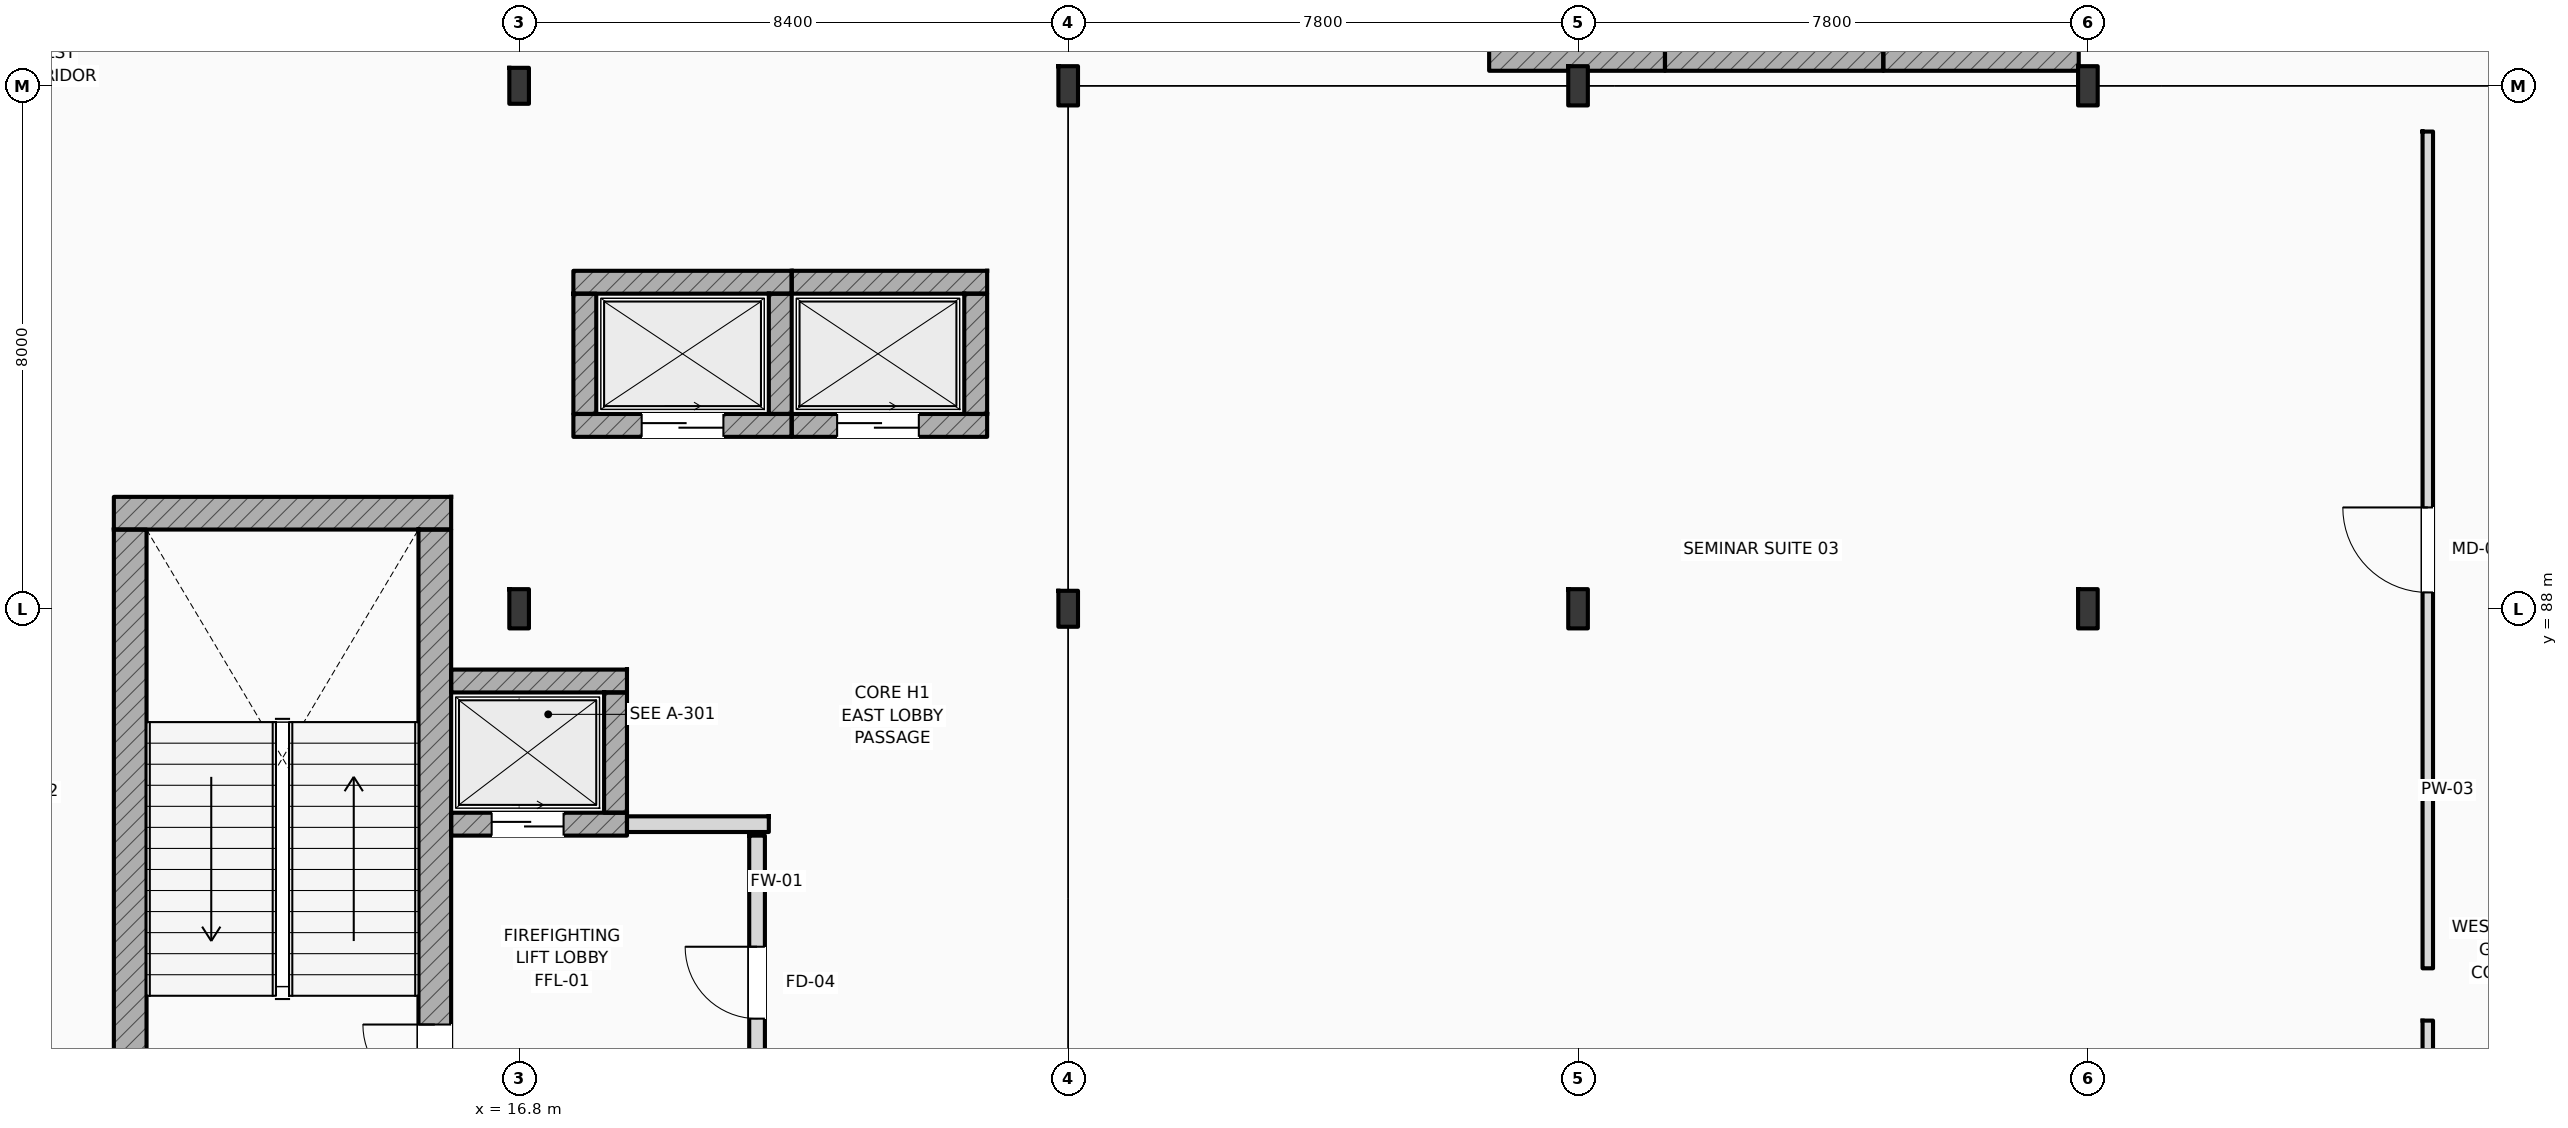
"""IFC4 building model, lengths in metres.
Left out: names, types, materials, properties, quantities, classifications, styles, units other than length and angle.
Written with IfcOpenShell. Run it as: python <this file> out.ifc"""

import sys

from ifc_helpers import new_model, si_unit, direction, frame, frame_2d, origin, origin_2d, place, context, subcontext, project, spatial, rectangle, i_section, extrude, element, fill, save


model = new_model("IFC4")
c1 = context("Model", 3, precision=1e-05, world=origin(), true_north=direction((0.0, 1.0)))
c2 = subcontext(c1, "Body", "Model", "MODEL_VIEW")
j1 = project(units=[si_unit("LENGTHUNIT", "METRE"), si_unit("PLANEANGLEUNIT", "RADIAN")], contexts=[c1])
p1 = place(None, origin())
s1 = spatial("IfcSite", under=j1, at=p1, CompositionType="ELEMENT")
p2 = place(p1, origin())
s2 = spatial("IfcBuilding", under=s1, at=p2, CompositionType="ELEMENT")
p3 = place(p2, frame((0.0, 0.0, 11.4)))
s3 = spatial("IfcBuildingStorey", under=s2, at=p3, CompositionType="ELEMENT", Elevation=11.4)
p4 = place(p3, frame((16.8, 88.0, 0.0), z_axis=(0.0, 0.0, 1.0), x_axis=(1.0, 0.0, 0.0)))
e1 = element("IfcColumn", 1, at=p4, inside=s3, PredefinedType="COLUMN", context=c2, shape_type="SweptSolid", body=[
    extrude(i_section(OverallWidth=0.3, OverallDepth=0.6, WebThickness=0.015, FlangeThickness=0.03, FilletRadius=0.027, at=origin_2d()), origin(), (0.0, 0.0, 1.0), 4.8),
])
for number, where, z_axis, x_axis in (
    (2, (16.8, 96.0, 0.0), (0.0, 0.0, 1.0), (1.0, 0.0, 0.0)),
    (3, (25.2, 88.0, 0.0), (0.0, 0.0, 1.0), (1.0, 0.0, 0.0)),
):
    element("IfcColumn", number, at=place(p3, frame(where, z_axis=z_axis, x_axis=x_axis)), inside=s3, PredefinedType="COLUMN", context=c2, shape_type="SweptSolid", body=[
        extrude(i_section(OverallWidth=0.3, OverallDepth=0.55, WebThickness=0.015, FlangeThickness=0.029, FilletRadius=0.027, at=origin_2d()), origin(), (0.0, 0.0, 1.0), 4.8),
    ])
for number, where, z_axis, x_axis in (
    (4, (25.2, 96.0, 0.0), (0.0, 0.0, 1.0), (1.0, 0.0, 0.0)),
    (5, (33.0, 96.0, 0.0), (0.0, 0.0, 1.0), (1.0, 0.0, 0.0)),
    (6, (40.8, 96.0, 0.0), (0.0, 0.0, 1.0), (1.0, 0.0, 0.0)),
    (7, (33.0, 88.0, 0.0), (0.0, 0.0, 1.0), (1.0, 0.0, 0.0)),
    (8, (40.8, 88.0, 0.0), (0.0, 0.0, 1.0), (1.0, 0.0, 0.0)),
):
    element("IfcColumn", number, at=place(p3, frame(where, z_axis=z_axis, x_axis=x_axis)), inside=s3, PredefinedType="COLUMN", context=c2, shape_type="SweptSolid", body=[
        extrude(i_section(OverallWidth=0.3, OverallDepth=0.6, WebThickness=0.015, FlangeThickness=0.03, FilletRadius=0.027, at=origin_2d()), origin(), (0.0, 0.0, 1.0), 4.8),
    ])
p5 = place(p3, frame((10.6, 89.462, 0.0), z_axis=(0.0, 0.0, 1.0), x_axis=(1.0, 0.0, 0.0)))
e9 = element("IfcWall", 9, at=p5, inside=s3, PredefinedType="SHEAR", context=c2, shape_type="SweptSolid", body=[
    extrude(rectangle(XDim=5.16, YDim=0.5, at=frame_2d((2.58, 0.0))), origin(), (0.0, 0.0, 1.0), 4.8),
])
p6 = place(p3, frame((10.85, 80.1, 0.0), z_axis=(0.0, 0.0, 1.0), x_axis=(0.0, 1.0, 0.0)))
e10 = element("IfcWall", 10, at=p6, inside=s3, PredefinedType="SHEAR", context=c2, shape_type="SweptSolid", body=[
    extrude(rectangle(XDim=9.112, YDim=0.5, at=frame_2d((4.556, 0.0))), origin(), (0.0, 0.0, 1.0), 4.8),
])
p7 = place(p3, frame((15.51, 80.1, 0.0), z_axis=(0.0, 0.0, 1.0), x_axis=(0.0, 1.0, 0.0)))
e11 = element("IfcWall", 11, at=p7, inside=s3, PredefinedType="SHEAR", context=c2, shape_type="SweptSolid", body=[
    extrude(rectangle(XDim=9.112, YDim=0.5, at=frame_2d((4.556, 0.0))), origin(), (0.0, 0.0, 1.0), 4.8),
])
p8 = place(p7, frame((0.44, 0.0, 0.0)))
e12 = element("IfcOpeningElement", 12, at=p8, cuts=e11, PredefinedType="OPENING", context=c2, shape_type="SweptSolid", body=[
    extrude(rectangle(XDim=1.1, YDim=2.2, at=frame_2d((0.55, 1.1))), frame((0.0, 0.26, 0.0), z_axis=(0.0, -1.0, 0.0), x_axis=(1.0, 0.0, 0.0)), (0.0, 0.0, 1.0), 0.52),
])
p9 = place(p3, frame((15.76, 86.895, 0.0), z_axis=(0.0, 0.0, 1.0), x_axis=(1.0, 0.0, 0.0)))
e13 = element("IfcWall", 13, at=p9, inside=s3, PredefinedType="SHEAR", context=c2, shape_type="SweptSolid", body=[
    extrude(rectangle(XDim=2.69, YDim=0.35, at=frame_2d((1.345, 0.0))), origin(), (0.0, 0.0, 1.0), 4.52),
])
p10 = place(p3, frame((15.76, 84.705, 0.0), z_axis=(0.0, 0.0, 1.0), x_axis=(1.0, 0.0, 0.0)))
e14 = element("IfcWall", 14, at=p10, inside=s3, PredefinedType="SHEAR", context=c2, shape_type="SweptSolid", body=[
    extrude(rectangle(XDim=2.69, YDim=0.35, at=frame_2d((1.345, 0.0))), origin(), (0.0, 0.0, 1.0), 4.52),
])
p11 = place(p10, frame((0.62, 0.0, 0.0)))
e15 = element("IfcOpeningElement", 15, at=p11, cuts=e14, PredefinedType="OPENING", context=c2, shape_type="SweptSolid", body=[
    extrude(rectangle(XDim=1.1, YDim=2.2, at=frame_2d((0.55, 1.1))), frame((0.0, 0.185, 0.0), z_axis=(0.0, -1.0, 0.0), x_axis=(1.0, 0.0, 0.0)), (0.0, 0.0, 1.0), 0.37),
])
p12 = place(p3, frame((18.275, 84.88, 0.0), z_axis=(0.0, 0.0, 1.0), x_axis=(0.0, 1.0, 0.0)))
e16 = element("IfcWall", 16, at=p12, inside=s3, PredefinedType="SHEAR", context=c2, shape_type="SweptSolid", body=[
    extrude(rectangle(XDim=1.84, YDim=0.35, at=frame_2d((0.92, 0.0))), origin(), (0.0, 0.0, 1.0), 4.52),
])
p13 = place(p3, frame((31.64, 96.405, 0.0), z_axis=(0.0, 0.0, 1.0), x_axis=(1.0, 0.0, 0.0)))
e17 = element("IfcWall", 17, at=p13, inside=s3, PredefinedType="SHEAR", context=c2, shape_type="SweptSolid", body=[
    extrude(rectangle(XDim=2.69, YDim=0.35, at=frame_2d((1.345, 0.0))), origin(), (0.0, 0.0, 1.0), 4.52),
])
p14 = place(p3, frame((17.63, 92.995, 0.0), z_axis=(0.0, 0.0, 1.0), x_axis=(1.0, 0.0, 0.0)))
e18 = element("IfcWall", 18, at=p14, inside=s3, PredefinedType="SHEAR", context=c2, shape_type="SweptSolid", body=[
    extrude(rectangle(XDim=3.34, YDim=0.35, at=frame_2d((1.67, 0.0))), origin(), (0.0, 0.0, 1.0), 4.52),
])
p15 = place(p3, frame((17.63, 90.805, 0.0), z_axis=(0.0, 0.0, 1.0), x_axis=(1.0, 0.0, 0.0)))
e19 = element("IfcWall", 19, at=p15, inside=s3, PredefinedType="SHEAR", context=c2, shape_type="SweptSolid", body=[
    extrude(rectangle(XDim=3.34, YDim=0.35, at=frame_2d((1.67, 0.0))), origin(), (0.0, 0.0, 1.0), 4.52),
])
p16 = place(p15, frame((1.045, 0.0, 0.0)))
e20 = element("IfcOpeningElement", 20, at=p16, cuts=e19, PredefinedType="OPENING", context=c2, shape_type="SweptSolid", body=[
    extrude(rectangle(XDim=1.25, YDim=2.25, at=frame_2d((0.625, 1.125))), frame((0.0, 0.185, 0.0), z_axis=(0.0, -1.0, 0.0), x_axis=(1.0, 0.0, 0.0)), (0.0, 0.0, 1.0), 0.37),
])
for number, where, z_axis, x_axis in (
    (21, (17.805, 90.98, 0.0), (0.0, 0.0, 1.0), (0.0, 1.0, 0.0)),
    (22, (20.795, 90.98, 0.0), (0.0, 0.0, 1.0), (0.0, 1.0, 0.0)),
):
    element("IfcWall", number, at=place(p3, frame(where, z_axis=z_axis, x_axis=x_axis)), inside=s3, PredefinedType="SHEAR", context=c2, shape_type="SweptSolid", body=[
        extrude(rectangle(XDim=1.84, YDim=0.35, at=frame_2d((0.92, 0.0))), origin(), (0.0, 0.0, 1.0), 4.52),
    ])
p17 = place(p3, frame((20.97, 92.995, 0.0), z_axis=(0.0, 0.0, 1.0), x_axis=(1.0, 0.0, 0.0)))
e23 = element("IfcWall", 23, at=p17, inside=s3, PredefinedType="SHEAR", context=c2, shape_type="SweptSolid", body=[
    extrude(rectangle(XDim=2.99, YDim=0.35, at=frame_2d((1.495, 0.0))), origin(), (0.0, 0.0, 1.0), 4.52),
])
p18 = place(p3, frame((20.97, 90.805, 0.0), z_axis=(0.0, 0.0, 1.0), x_axis=(1.0, 0.0, 0.0)))
e24 = element("IfcWall", 24, at=p18, inside=s3, PredefinedType="SHEAR", context=c2, shape_type="SweptSolid", body=[
    extrude(rectangle(XDim=2.99, YDim=0.35, at=frame_2d((1.495, 0.0))), origin(), (0.0, 0.0, 1.0), 4.52),
])
p19 = place(p18, frame((0.695, 0.0, 0.0)))
e25 = element("IfcOpeningElement", 25, at=p19, cuts=e24, PredefinedType="OPENING", context=c2, shape_type="SweptSolid", body=[
    extrude(rectangle(XDim=1.25, YDim=2.25, at=frame_2d((0.625, 1.125))), frame((0.0, 0.185, 0.0), z_axis=(0.0, -1.0, 0.0), x_axis=(1.0, 0.0, 0.0)), (0.0, 0.0, 1.0), 0.37),
])
p20 = place(p3, frame((23.785, 90.98, 0.0), z_axis=(0.0, 0.0, 1.0), x_axis=(0.0, 1.0, 0.0)))
e26 = element("IfcWall", 26, at=p20, inside=s3, PredefinedType="SHEAR", context=c2, shape_type="SweptSolid", body=[
    extrude(rectangle(XDim=1.84, YDim=0.35, at=frame_2d((0.92, 0.0))), origin(), (0.0, 0.0, 1.0), 4.52),
])
p21 = place(p3, frame((34.33, 96.405, 0.0), z_axis=(0.0, 0.0, 1.0), x_axis=(1.0, 0.0, 0.0)))
e27 = element("IfcWall", 27, at=p21, inside=s3, PredefinedType="SHEAR", context=c2, shape_type="SweptSolid", body=[
    extrude(rectangle(XDim=3.34, YDim=0.35, at=frame_2d((1.67, 0.0))), origin(), (0.0, 0.0, 1.0), 4.52),
])
p22 = place(p3, frame((37.67, 96.405, 0.0), z_axis=(0.0, 0.0, 1.0), x_axis=(1.0, 0.0, 0.0)))
e28 = element("IfcWall", 28, at=p22, inside=s3, PredefinedType="SHEAR", context=c2, shape_type="SweptSolid", body=[
    extrude(rectangle(XDim=2.99, YDim=0.35, at=frame_2d((1.495, 0.0))), origin(), (0.0, 0.0, 1.0), 4.52),
])
p23 = place(p3, frame((18.45, 84.705, 0.0), z_axis=(0.0, 0.0, 1.0), x_axis=(1.0, 0.0, 0.0)))
e29 = element("IfcWall", 29, at=p23, inside=s3, PredefinedType="STANDARD", context=c2, shape_type="SweptSolid", body=[
    extrude(rectangle(XDim=2.17, YDim=0.24, at=frame_2d((1.085, 0.0))), origin(), (0.0, 0.0, 1.0), 4.52),
])
p24 = place(p3, frame((20.44, 80.08, 0.0), z_axis=(0.0, 0.0, 1.0), x_axis=(0.0, 1.0, 0.0)))
e30 = element("IfcWall", 30, at=p24, inside=s3, PredefinedType="STANDARD", context=c2, shape_type="SweptSolid", body=[
    extrude(rectangle(XDim=4.45, YDim=0.24, at=frame_2d((2.225, 0.0))), origin(), (0.0, 0.0, 1.0), 4.52),
])
p25 = place(p24, frame((1.65, 0.0, 0.0)))
e31 = element("IfcOpeningElement", 31, at=p25, cuts=e30, PredefinedType="OPENING", context=c2, shape_type="SweptSolid", body=[
    extrude(rectangle(XDim=1.1, YDim=2.2, at=frame_2d((0.55, 1.1))), frame((0.0, 0.13, 0.0), z_axis=(0.0, -1.0, 0.0), x_axis=(1.0, 0.0, 0.0)), (0.0, 0.0, 1.0), 0.26),
])
p26 = place(p3, frame((46.0, 68.5, 0.0), z_axis=(0.0, 0.0, 1.0), x_axis=(0.0, 1.0, 0.0)))
e32 = element("IfcWall", 32, at=p26, inside=s3, PredefinedType="PARTITIONING", context=c2, shape_type="SweptSolid", body=[
    extrude(rectangle(XDim=13.2, YDim=0.16, at=frame_2d((6.6, 0.0))), origin(), (0.0, 0.0, 1.0), 4.18),
])
p27 = place(p26, frame((5.95, 0.0, 0.0)))
e33 = element("IfcOpeningElement", 33, at=p27, cuts=e32, PredefinedType="OPENING", context=c2, shape_type="SweptSolid", body=[
    extrude(rectangle(XDim=1.3, YDim=2.2, at=frame_2d((0.65, 1.1))), frame((0.0, 0.09, 0.0), z_axis=(0.0, -1.0, 0.0), x_axis=(1.0, 0.0, 0.0)), (0.0, 0.0, 1.0), 0.18),
])
p28 = place(p3, frame((46.0, 82.5, 0.0), z_axis=(0.0, 0.0, 1.0), x_axis=(0.0, 1.0, 0.0)))
e34 = element("IfcWall", 34, at=p28, inside=s3, PredefinedType="PARTITIONING", context=c2, shape_type="SweptSolid", body=[
    extrude(rectangle(XDim=12.8, YDim=0.16, at=frame_2d((6.4, 0.0))), origin(), (0.0, 0.0, 1.0), 4.18),
])
p29 = place(p28, frame((5.75, 0.0, 0.0)))
e35 = element("IfcOpeningElement", 35, at=p29, cuts=e34, PredefinedType="OPENING", context=c2, shape_type="SweptSolid", body=[
    extrude(rectangle(XDim=1.3, YDim=2.2, at=frame_2d((0.65, 1.1))), frame((0.0, 0.09, 0.0), z_axis=(0.0, -1.0, 0.0), x_axis=(1.0, 0.0, 0.0)), (0.0, 0.0, 1.0), 0.18),
])
p30 = place(p8, origin())
e36 = element("IfcDoor", 36, at=p30, inside=s3, OperationType="SINGLE_SWING_RIGHT", PredefinedType="DOOR", context=c2, shape_type="SweptSolid", body=[
    extrude(rectangle(XDim=1.1, YDim=2.2, at=frame_2d((0.55, 1.1))), frame((0.0, 0.025, 0.0), z_axis=(0.0, -1.0, 0.0), x_axis=(1.0, 0.0, 0.0)), (0.0, 0.0, 1.0), 0.05),
])
fill(e12, e36)
p31 = place(p11, origin())
e37 = element("IfcDoor", 37, at=p31, inside=s3, OperationType="SLIDING_TO_LEFT", PredefinedType="DOOR", context=c2, shape_type="SweptSolid", body=[
    extrude(rectangle(XDim=1.1, YDim=2.2, at=frame_2d((0.55, 1.1))), frame((0.0, 0.025, 0.0), z_axis=(0.0, -1.0, 0.0), x_axis=(1.0, 0.0, 0.0)), (0.0, 0.0, 1.0), 0.05),
])
fill(e15, e37)
p32 = place(p16, origin())
e38 = element("IfcDoor", 38, at=p32, inside=s3, OperationType="SLIDING_TO_LEFT", PredefinedType="DOOR", context=c2, shape_type="SweptSolid", body=[
    extrude(rectangle(XDim=1.25, YDim=2.25, at=frame_2d((0.625, 1.125))), frame((0.0, 0.025, 0.0), z_axis=(0.0, -1.0, 0.0), x_axis=(1.0, 0.0, 0.0)), (0.0, 0.0, 1.0), 0.05),
])
fill(e20, e38)
p33 = place(p19, origin())
e39 = element("IfcDoor", 39, at=p33, inside=s3, OperationType="SLIDING_TO_LEFT", PredefinedType="DOOR", context=c2, shape_type="SweptSolid", body=[
    extrude(rectangle(XDim=1.25, YDim=2.25, at=frame_2d((0.625, 1.125))), frame((0.0, 0.025, 0.0), z_axis=(0.0, -1.0, 0.0), x_axis=(1.0, 0.0, 0.0)), (0.0, 0.0, 1.0), 0.05),
])
fill(e25, e39)
p34 = place(p25, origin())
e40 = element("IfcDoor", 40, at=p34, inside=s3, OperationType="SINGLE_SWING_RIGHT", PredefinedType="DOOR", context=c2, shape_type="SweptSolid", body=[
    extrude(rectangle(XDim=1.1, YDim=2.2, at=frame_2d((0.55, 1.1))), frame((0.0, 0.025, 0.0), z_axis=(0.0, -1.0, 0.0), x_axis=(1.0, 0.0, 0.0)), (0.0, 0.0, 1.0), 0.05),
])
fill(e31, e40)
p35 = place(p29, origin())
e41 = element("IfcDoor", 41, at=p35, inside=s3, OperationType="SINGLE_SWING_RIGHT", PredefinedType="DOOR", context=c2, shape_type="SweptSolid", body=[
    extrude(rectangle(XDim=1.3, YDim=2.2, at=frame_2d((0.65, 1.1))), frame((0.0, 0.025, 0.0), z_axis=(0.0, -1.0, 0.0), x_axis=(1.0, 0.0, 0.0)), (0.0, 0.0, 1.0), 0.05),
])
fill(e35, e41)
save(model, sys.argv[1])
